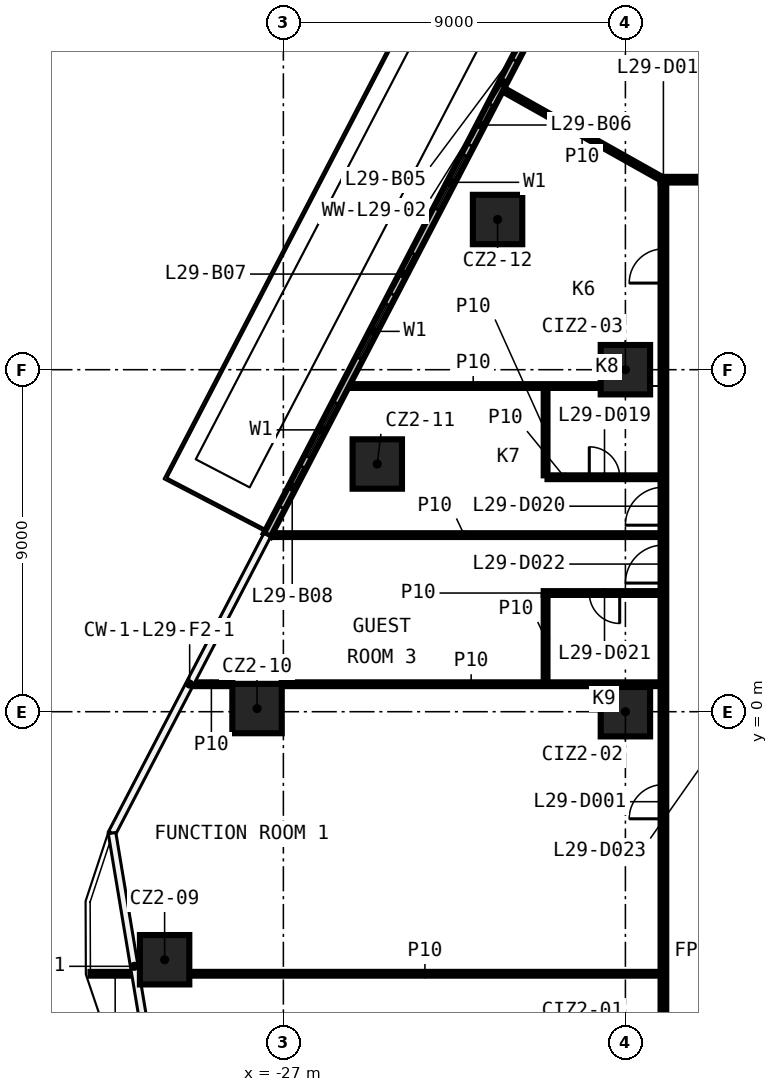
"""IFC4 building model, lengths in metres.
Left out: names, types, materials, properties, quantities, classifications, styles, units other than length and angle.
Written with IfcOpenShell. Run it as: python <this file> out.ifc"""

import sys

from ifc_helpers import new_model, si_unit, direction, frame, frame_2d, origin, origin_2d, place, context, subcontext, project, spatial, rectangle, extrude, element, fill, save


model = new_model("IFC4")
c1 = context("Model", 3, precision=1e-05, world=origin(), true_north=direction((0.0, 1.0)))
c2 = subcontext(c1, "Body", "Model", "MODEL_VIEW")
j1 = project(units=[si_unit("LENGTHUNIT", "METRE"), si_unit("PLANEANGLEUNIT", "RADIAN")], contexts=[c1])
p1 = place(None, origin())
s1 = spatial("IfcSite", under=j1, at=p1, CompositionType="ELEMENT")
p2 = place(p1, origin())
s2 = spatial("IfcBuilding", under=s1, at=p2, CompositionType="ELEMENT")
p3 = place(p2, frame((0.0, 0.0, 132.2)))
s3 = spatial("IfcBuildingStorey", under=s2, at=p3, CompositionType="ELEMENT", Elevation=132.2)
for number, where, z_axis, x_axis in (
    (1, (-30.125, -6.527, 0.0), (0.0, 0.0, 1.0), (1.0, 0.0, 0.0)),
    (2, (-27.693, 0.083, 0.0), (0.0, 0.0, 1.0), (1.0, 0.0, 0.0)),
    (3, (-24.529, 6.518, 0.0), (0.0, 0.0, 1.0), (1.0, 0.0, 0.0)),
    (4, (-21.364, 12.952, 0.0), (0.0, 0.0, 1.0), (1.0, 0.0, 0.0)),
    (5, (-18.0, 0.0, 0.0), (0.0, 0.0, 1.0), (1.0, 0.0, 0.0)),
    (6, (-18.0, 9.0, 0.0), (0.0, 0.0, 1.0), (1.0, 0.0, 0.0)),
):
    element("IfcColumn", number, at=place(p3, frame(where, z_axis=z_axis, x_axis=x_axis)), inside=s3, PredefinedType="COLUMN", context=c2, shape_type="SweptSolid", body=[
        extrude(rectangle(XDim=1.3, YDim=1.3, at=origin_2d()), origin(), (0.0, 0.0, 1.0), 3.3),
    ])
p4 = place(p3, frame((-32.076, -6.896, 0.0), z_axis=(0.0, 0.0, 1.0), x_axis=(1.0, 0.0, 0.0)))
e7 = element("IfcWall", 7, at=p4, inside=s3, PredefinedType="PARTITIONING", context=c2, shape_type="SweptSolid", body=[
    extrude(rectangle(XDim=1.301, YDim=0.1, at=frame_2d((0.651, 0.0))), origin(), (0.0, 0.0, 1.0), 3.3),
])
p5 = place(p3, frame((-29.475, -6.896, 0.0), z_axis=(0.0, 0.0, 1.0), x_axis=(1.0, 0.0, 0.0)))
e8 = element("IfcWall", 8, at=p5, inside=s3, PredefinedType="PARTITIONING", context=c2, shape_type="SweptSolid", body=[
    extrude(rectangle(XDim=12.4, YDim=0.1, at=frame_2d((6.2, 0.0))), origin(), (0.0, 0.0, 1.0), 3.3),
])
p6 = place(p3, frame((-29.446, 0.723, 0.0), z_axis=(0.0, 0.0, 1.0), x_axis=(1.0, 0.0, 0.0)))
e9 = element("IfcWall", 9, at=p6, inside=s3, PredefinedType="PARTITIONING", context=c2, shape_type="SweptSolid", body=[
    extrude(rectangle(XDim=1.103, YDim=0.1, at=frame_2d((0.551, 0.0))), origin(), (0.0, 0.0, 1.0), 3.3),
])
p7 = place(p3, frame((-27.043, 0.723, 0.0), z_axis=(0.0, 0.0, 1.0), x_axis=(1.0, 0.0, 0.0)))
e10 = element("IfcWall", 10, at=p7, inside=s3, PredefinedType="PARTITIONING", context=c2, shape_type="SweptSolid", body=[
    extrude(rectangle(XDim=9.968, YDim=0.1, at=frame_2d((4.984, 0.0))), origin(), (0.0, 0.0, 1.0), 3.3),
])
p8 = place(p3, frame((-17.075, 3.123, 0.0), z_axis=(0.0, 0.0, 1.0), x_axis=(-1.0, 0.0, 0.0)))
e11 = element("IfcWall", 11, at=p8, inside=s3, PredefinedType="PARTITIONING", context=c2, shape_type="SweptSolid", body=[
    extrude(rectangle(XDim=3.075, YDim=0.1, at=frame_2d((1.538, 0.0))), origin(), (0.0, 0.0, 1.0), 3.3),
])
p9 = place(p8, frame((1.075, 0.0, 0.0)))
e12 = element("IfcOpeningElement", 12, at=p9, cuts=e11, PredefinedType="OPENING", context=c2, shape_type="SweptSolid", body=[
    extrude(rectangle(XDim=0.8, YDim=2.1, at=frame_2d((0.4, 1.05))), frame((0.0, 0.06, 0.0), z_axis=(0.0, -1.0, 0.0), x_axis=(1.0, 0.0, 0.0)), (0.0, 0.0, 1.0), 0.12),
])
p10 = place(p3, frame((-27.402, 4.647, 0.0), z_axis=(0.0, 0.0, 1.0), x_axis=(1.0, 0.0, 0.0)))
e13 = element("IfcWall", 13, at=p10, inside=s3, PredefinedType="PARTITIONING", context=c2, shape_type="SweptSolid", body=[
    extrude(rectangle(XDim=10.327, YDim=0.1, at=frame_2d((5.164, 0.0))), origin(), (0.0, 0.0, 1.0), 3.3),
])
p11 = place(p3, frame((-20.05, 6.17, 0.0), z_axis=(0.0, 0.0, 1.0), x_axis=(1.0, 0.0, 0.0)))
e14 = element("IfcWall", 14, at=p11, inside=s3, PredefinedType="PARTITIONING", context=c2, shape_type="SweptSolid", body=[
    extrude(rectangle(XDim=2.975, YDim=0.1, at=frame_2d((1.488, 0.0))), origin(), (0.0, 0.0, 1.0), 3.3),
])
p12 = place(p11, frame((1.1, 0.0, 0.0)))
e15 = element("IfcOpeningElement", 15, at=p12, cuts=e14, PredefinedType="OPENING", context=c2, shape_type="SweptSolid", body=[
    extrude(rectangle(XDim=0.8, YDim=2.1, at=frame_2d((0.4, 1.05))), frame((0.0, 0.06, 0.0), z_axis=(0.0, -1.0, 0.0), x_axis=(1.0, 0.0, 0.0)), (0.0, 0.0, 1.0), 0.12),
])
p13 = place(p3, frame((-25.359, 8.57, 0.0), z_axis=(0.0, 0.0, 1.0), x_axis=(1.0, 0.0, 0.0)))
e16 = element("IfcWall", 16, at=p13, inside=s3, PredefinedType="PARTITIONING", context=c2, shape_type="SweptSolid", body=[
    extrude(rectangle(XDim=6.709, YDim=0.1, at=frame_2d((3.354, 0.0))), origin(), (0.0, 0.0, 1.0), 3.3),
])
p14 = place(p3, frame((-17.075, 14.0, 0.0), z_axis=(0.0, 0.0, 1.0), x_axis=(1.0, 0.0, 0.0)))
e17 = element("IfcWall", 17, at=p14, inside=s3, PredefinedType="PARTITIONING", context=c2, shape_type="SweptSolid", body=[
    extrude(rectangle(XDim=34.15, YDim=0.15, at=frame_2d((17.075, 0.0))), origin(), (0.0, 0.0, 1.0), 3.3),
])
p15 = place(p14, frame((10.954, 0.0, 0.0)))
e18 = element("IfcOpeningElement", 18, at=p15, cuts=e17, PredefinedType="OPENING", context=c2, shape_type="SweptSolid", body=[
    extrude(rectangle(XDim=0.9, YDim=2.1, at=frame_2d((0.45, 1.05))), frame((0.0, 0.085, 0.0), z_axis=(0.0, -1.0, 0.0), x_axis=(1.0, 0.0, 0.0)), (0.0, 0.0, 1.0), 0.17),
])
p16 = place(p14, frame((7.617, 0.0, 0.0)))
e19 = element("IfcOpeningElement", 19, at=p16, cuts=e17, PredefinedType="OPENING", context=c2, shape_type="SweptSolid", body=[
    extrude(rectangle(XDim=1.0, YDim=2.1, at=frame_2d((0.5, 1.05))), frame((0.0, 0.085, 0.0), z_axis=(0.0, -1.0, 0.0), x_axis=(1.0, 0.0, 0.0)), (0.0, 0.0, 1.0), 0.17),
])
p17 = place(p14, frame((2.425, 0.0, 0.0)))
e20 = element("IfcOpeningElement", 20, at=p17, cuts=e17, PredefinedType="OPENING", context=c2, shape_type="SweptSolid", body=[
    extrude(rectangle(XDim=0.9, YDim=2.1, at=frame_2d((0.45, 1.05))), frame((0.0, 0.085, 0.0), z_axis=(0.0, -1.0, 0.0), x_axis=(1.0, 0.0, 0.0)), (0.0, 0.0, 1.0), 0.17),
])
p18 = place(p3, frame((-17.0, -13.925, 0.0), z_axis=(0.0, 0.0, 1.0), x_axis=(0.0, 1.0, 0.0)))
e21 = element("IfcWall", 21, at=p18, inside=s3, PredefinedType="PARTITIONING", context=c2, shape_type="SweptSolid", body=[
    extrude(rectangle(XDim=27.85, YDim=0.15, at=frame_2d((13.925, 0.0))), origin(), (0.0, 0.0, 1.0), 3.3),
])
p19 = place(p18, frame((11.107, 0.0, 0.0)))
e22 = element("IfcOpeningElement", 22, at=p19, cuts=e21, PredefinedType="OPENING", context=c2, shape_type="SweptSolid", body=[
    extrude(rectangle(XDim=0.9, YDim=2.1, at=frame_2d((0.45, 1.05))), frame((0.0, 0.085, 0.0), z_axis=(0.0, -1.0, 0.0), x_axis=(1.0, 0.0, 0.0)), (0.0, 0.0, 1.0), 0.17),
])
p20 = place(p18, frame((25.204, 0.0, 0.0)))
e23 = element("IfcOpeningElement", 23, at=p20, cuts=e21, PredefinedType="OPENING", context=c2, shape_type="SweptSolid", body=[
    extrude(rectangle(XDim=0.9, YDim=2.1, at=frame_2d((0.45, 1.05))), frame((0.0, 0.085, 0.0), z_axis=(0.0, -1.0, 0.0), x_axis=(1.0, 0.0, 0.0)), (0.0, 0.0, 1.0), 0.17),
])
p21 = place(p18, frame((18.833, 0.0, 0.0)))
e24 = element("IfcOpeningElement", 24, at=p21, cuts=e21, PredefinedType="OPENING", context=c2, shape_type="SweptSolid", body=[
    extrude(rectangle(XDim=1.0, YDim=2.1, at=frame_2d((0.5, 1.05))), frame((0.0, 0.085, 0.0), z_axis=(0.0, -1.0, 0.0), x_axis=(1.0, 0.0, 0.0)), (0.0, 0.0, 1.0), 0.17),
])
p22 = place(p18, frame((17.31, 0.0, 0.0)))
e25 = element("IfcOpeningElement", 25, at=p22, cuts=e21, PredefinedType="OPENING", context=c2, shape_type="SweptSolid", body=[
    extrude(rectangle(XDim=1.0, YDim=2.1, at=frame_2d((0.5, 1.05))), frame((0.0, 0.085, 0.0), z_axis=(0.0, -1.0, 0.0), x_axis=(1.0, 0.0, 0.0)), (0.0, 0.0, 1.0), 0.17),
])
for number, where, z_axis, x_axis in (
    (26, (-20.1, 0.773, 0.0), (0.0, 0.0, 1.0), (0.0, 1.0, 0.0)),
    (27, (-20.1, 6.219, 0.0), (0.0, 0.0, 1.0), (0.0, 1.0, 0.0)),
):
    element("IfcWall", number, at=place(p3, frame(where, z_axis=z_axis, x_axis=x_axis)), inside=s3, PredefinedType="PARTITIONING", context=c2, shape_type="SweptSolid", body=[
        extrude(rectangle(XDim=2.3, YDim=0.1, at=frame_2d((1.15, 0.0))), origin(), (0.0, 0.0, 1.0), 3.3),
    ])
p23 = place(p3, frame((-21.279, 16.405, 0.0), z_axis=(0.0, 0.0, 1.0), x_axis=(0.871729599924, -0.489987249443, 0.0)))
e28 = element("IfcWall", 28, at=p23, inside=s3, PredefinedType="PARTITIONING", context=c2, shape_type="SweptSolid", body=[
    extrude(rectangle(XDim=4.908, YDim=0.1, at=frame_2d((2.454, 0.0))), origin(), (0.0, 0.0, 1.0), 3.3),
])
p24 = place(p3, frame((-17.21, 24.26, 0.0), z_axis=(0.0, 0.0, 1.0), x_axis=(-0.461902936619, -0.886930480445, 0.0)))
e29 = element("IfcWall", 29, at=p24, inside=s3, PredefinedType="SOLIDWALL", context=c2, shape_type="SweptSolid", body=[
    extrude(rectangle(XDim=22.113, YDim=0.2, at=frame_2d((11.057, 0.0))), origin(), (0.0, 0.0, 1.0), 3.3),
])
p25 = place(p24, frame((2.0, 0.0, 0.6)))
e30 = element("IfcOpeningElement", 30, at=p25, cuts=e29, PredefinedType="OPENING", context=c2, shape_type="SweptSolid", body=[
    extrude(rectangle(XDim=1.6, YDim=2.4, at=frame_2d((0.8, 1.2))), frame((0.0, 0.11, 0.0), z_axis=(0.0, -1.0, 0.0), x_axis=(1.0, 0.0, 0.0)), (0.0, 0.0, 1.0), 0.22),
])
p26 = place(p24, frame((0.5, 0.0, 0.0)))
e31 = element("IfcOpeningElement", 31, at=p26, cuts=e29, PredefinedType="OPENING", context=c2, shape_type="SweptSolid", body=[
    extrude(rectangle(XDim=1.2, YDim=2.4, at=frame_2d((0.6, 1.2))), frame((0.0, 0.11, 0.0), z_axis=(0.0, -1.0, 0.0), x_axis=(1.0, 0.0, 0.0)), (0.0, 0.0, 1.0), 0.22),
])
p27 = place(p24, frame((4.923, 0.0, 0.6)))
e32 = element("IfcOpeningElement", 32, at=p27, cuts=e29, PredefinedType="OPENING", context=c2, shape_type="SweptSolid", body=[
    extrude(rectangle(XDim=1.6, YDim=2.4, at=frame_2d((0.8, 1.2))), frame((0.0, 0.11, 0.0), z_axis=(0.0, -1.0, 0.0), x_axis=(1.0, 0.0, 0.0)), (0.0, 0.0, 1.0), 0.22),
])
p28 = place(p24, frame((6.823, 0.0, 0.0)))
e33 = element("IfcOpeningElement", 33, at=p28, cuts=e29, PredefinedType="OPENING", context=c2, shape_type="SweptSolid", body=[
    extrude(rectangle(XDim=1.2, YDim=2.4, at=frame_2d((0.6, 1.2))), frame((0.0, 0.11, 0.0), z_axis=(0.0, -1.0, 0.0), x_axis=(1.0, 0.0, 0.0)), (0.0, 0.0, 1.0), 0.22),
])
p29 = place(p24, frame((10.845, 0.0, 0.6)))
e34 = element("IfcOpeningElement", 34, at=p29, cuts=e29, PredefinedType="OPENING", context=c2, shape_type="SweptSolid", body=[
    extrude(rectangle(XDim=1.6, YDim=2.4, at=frame_2d((0.8, 1.2))), frame((0.0, 0.11, 0.0), z_axis=(0.0, -1.0, 0.0), x_axis=(1.0, 0.0, 0.0)), (0.0, 0.0, 1.0), 0.22),
])
p30 = place(p24, frame((9.345, 0.0, 0.0)))
e35 = element("IfcOpeningElement", 35, at=p30, cuts=e29, PredefinedType="OPENING", context=c2, shape_type="SweptSolid", body=[
    extrude(rectangle(XDim=1.2, YDim=2.4, at=frame_2d((0.6, 1.2))), frame((0.0, 0.11, 0.0), z_axis=(0.0, -1.0, 0.0), x_axis=(1.0, 0.0, 0.0)), (0.0, 0.0, 1.0), 0.22),
])
p31 = place(p24, frame((15.268, 0.0, 0.6)))
e36 = element("IfcOpeningElement", 36, at=p31, cuts=e29, PredefinedType="OPENING", context=c2, shape_type="SweptSolid", body=[
    extrude(rectangle(XDim=1.6, YDim=2.4, at=frame_2d((0.8, 1.2))), frame((0.0, 0.11, 0.0), z_axis=(0.0, -1.0, 0.0), x_axis=(1.0, 0.0, 0.0)), (0.0, 0.0, 1.0), 0.22),
])
p32 = place(p24, frame((13.768, 0.0, 0.0)))
e37 = element("IfcOpeningElement", 37, at=p32, cuts=e29, PredefinedType="OPENING", context=c2, shape_type="SweptSolid", body=[
    extrude(rectangle(XDim=1.2, YDim=2.4, at=frame_2d((0.6, 1.2))), frame((0.0, 0.11, 0.0), z_axis=(0.0, -1.0, 0.0), x_axis=(1.0, 0.0, 0.0)), (0.0, 0.0, 1.0), 0.22),
])
p33 = place(p24, frame((18.19, 0.0, 0.6)))
e38 = element("IfcOpeningElement", 38, at=p33, cuts=e29, PredefinedType="OPENING", context=c2, shape_type="SweptSolid", body=[
    extrude(rectangle(XDim=1.6, YDim=2.4, at=frame_2d((0.8, 1.2))), frame((0.0, 0.11, 0.0), z_axis=(0.0, -1.0, 0.0), x_axis=(1.0, 0.0, 0.0)), (0.0, 0.0, 1.0), 0.22),
])
p34 = place(p24, frame((20.09, 0.0, 0.0)))
e39 = element("IfcOpeningElement", 39, at=p34, cuts=e29, PredefinedType="OPENING", context=c2, shape_type="SweptSolid", body=[
    extrude(rectangle(XDim=1.2, YDim=2.4, at=frame_2d((0.6, 1.2))), frame((0.0, 0.11, 0.0), z_axis=(0.0, -1.0, 0.0), x_axis=(1.0, 0.0, 0.0)), (0.0, 0.0, 1.0), 0.22),
])
p35 = place(p19, origin())
e40 = element("IfcDoor", 40, at=p35, inside=s3, OperationType="SINGLE_SWING_RIGHT", PredefinedType="DOOR", context=c2, shape_type="SweptSolid", body=[
    extrude(rectangle(XDim=0.9, YDim=2.1, at=frame_2d((0.45, 1.05))), frame((0.0, 0.025, 0.0), z_axis=(0.0, -1.0, 0.0), x_axis=(1.0, 0.0, 0.0)), (0.0, 0.0, 1.0), 0.05),
])
fill(e22, e40)
p36 = place(p20, origin())
e41 = element("IfcDoor", 41, at=p36, inside=s3, OperationType="SINGLE_SWING_LEFT", PredefinedType="DOOR", context=c2, shape_type="SweptSolid", body=[
    extrude(rectangle(XDim=0.9, YDim=2.1, at=frame_2d((0.45, 1.05))), frame((0.0, 0.025, 0.0), z_axis=(0.0, -1.0, 0.0), x_axis=(1.0, 0.0, 0.0)), (0.0, 0.0, 1.0), 0.05),
])
fill(e23, e41)
p37 = place(p12, origin())
e42 = element("IfcDoor", 42, at=p37, inside=s3, OperationType="SINGLE_SWING_LEFT", PredefinedType="DOOR", context=c2, shape_type="SweptSolid", body=[
    extrude(rectangle(XDim=0.8, YDim=2.1, at=frame_2d((0.4, 1.05))), frame((0.0, 0.025, 0.0), z_axis=(0.0, -1.0, 0.0), x_axis=(1.0, 0.0, 0.0)), (0.0, 0.0, 1.0), 0.05),
])
fill(e15, e42)
p38 = place(p21, origin())
e43 = element("IfcDoor", 43, at=p38, inside=s3, OperationType="SINGLE_SWING_RIGHT", PredefinedType="DOOR", context=c2, shape_type="SweptSolid", body=[
    extrude(rectangle(XDim=1.0, YDim=2.1, at=frame_2d((0.5, 1.05))), frame((0.0, 0.025, 0.0), z_axis=(0.0, -1.0, 0.0), x_axis=(1.0, 0.0, 0.0)), (0.0, 0.0, 1.0), 0.05),
])
fill(e24, e43)
p39 = place(p9, origin())
e44 = element("IfcDoor", 44, at=p39, inside=s3, OperationType="SINGLE_SWING_RIGHT", PredefinedType="DOOR", context=c2, shape_type="SweptSolid", body=[
    extrude(rectangle(XDim=0.8, YDim=2.1, at=frame_2d((0.4, 1.05))), frame((0.0, 0.025, 0.0), z_axis=(0.0, -1.0, 0.0), x_axis=(1.0, 0.0, 0.0)), (0.0, 0.0, 1.0), 0.05),
])
fill(e12, e44)
p40 = place(p22, origin())
e45 = element("IfcDoor", 45, at=p40, inside=s3, OperationType="SINGLE_SWING_LEFT", PredefinedType="DOOR", context=c2, shape_type="SweptSolid", body=[
    extrude(rectangle(XDim=1.0, YDim=2.1, at=frame_2d((0.5, 1.05))), frame((0.0, 0.025, 0.0), z_axis=(0.0, -1.0, 0.0), x_axis=(1.0, 0.0, 0.0)), (0.0, 0.0, 1.0), 0.05),
])
fill(e25, e45)
p41 = place(p28, origin())
e46 = element("IfcDoor", 46, at=p41, inside=s3, OperationType="SLIDING_TO_LEFT", PredefinedType="DOOR", context=c2, shape_type="SweptSolid", body=[
    extrude(rectangle(XDim=1.2, YDim=2.4, at=frame_2d((0.6, 1.2))), frame((0.0, 0.025, 0.0), z_axis=(0.0, -1.0, 0.0), x_axis=(1.0, 0.0, 0.0)), (0.0, 0.0, 1.0), 0.05),
])
fill(e33, e46)
p42 = place(p29, origin())
e47 = element("IfcWindow", 47, at=p42, inside=s3, PartitioningType="SINGLE_PANEL", PredefinedType="WINDOW", context=c2, shape_type="SweptSolid", body=[
    extrude(rectangle(XDim=1.6, YDim=2.4, at=frame_2d((0.8, 1.2))), frame((0.0, 0.03, 0.0), z_axis=(0.0, -1.0, 0.0), x_axis=(1.0, 0.0, 0.0)), (0.0, 0.0, 1.0), 0.06),
])
fill(e34, e47)
p43 = place(p30, origin())
e48 = element("IfcDoor", 48, at=p43, inside=s3, OperationType="SLIDING_TO_LEFT", PredefinedType="DOOR", context=c2, shape_type="SweptSolid", body=[
    extrude(rectangle(XDim=1.2, YDim=2.4, at=frame_2d((0.6, 1.2))), frame((0.0, 0.025, 0.0), z_axis=(0.0, -1.0, 0.0), x_axis=(1.0, 0.0, 0.0)), (0.0, 0.0, 1.0), 0.05),
])
fill(e35, e48)
p44 = place(p31, origin())
e49 = element("IfcWindow", 49, at=p44, inside=s3, PartitioningType="SINGLE_PANEL", PredefinedType="WINDOW", context=c2, shape_type="SweptSolid", body=[
    extrude(rectangle(XDim=1.6, YDim=2.4, at=frame_2d((0.8, 1.2))), frame((0.0, 0.03, 0.0), z_axis=(0.0, -1.0, 0.0), x_axis=(1.0, 0.0, 0.0)), (0.0, 0.0, 1.0), 0.06),
])
fill(e36, e49)
p45 = place(p32, origin())
e50 = element("IfcDoor", 50, at=p45, inside=s3, OperationType="SLIDING_TO_LEFT", PredefinedType="DOOR", context=c2, shape_type="SweptSolid", body=[
    extrude(rectangle(XDim=1.2, YDim=2.4, at=frame_2d((0.6, 1.2))), frame((0.0, 0.025, 0.0), z_axis=(0.0, -1.0, 0.0), x_axis=(1.0, 0.0, 0.0)), (0.0, 0.0, 1.0), 0.05),
])
fill(e37, e50)
p46 = place(p33, origin())
e51 = element("IfcWindow", 51, at=p46, inside=s3, PartitioningType="SINGLE_PANEL", PredefinedType="WINDOW", context=c2, shape_type="SweptSolid", body=[
    extrude(rectangle(XDim=1.6, YDim=2.4, at=frame_2d((0.8, 1.2))), frame((0.0, 0.03, 0.0), z_axis=(0.0, -1.0, 0.0), x_axis=(1.0, 0.0, 0.0)), (0.0, 0.0, 1.0), 0.06),
])
fill(e38, e51)
p47 = place(p34, origin())
e52 = element("IfcDoor", 52, at=p47, inside=s3, OperationType="SLIDING_TO_LEFT", PredefinedType="DOOR", context=c2, shape_type="SweptSolid", body=[
    extrude(rectangle(XDim=1.2, YDim=2.4, at=frame_2d((0.6, 1.2))), frame((0.0, 0.025, 0.0), z_axis=(0.0, -1.0, 0.0), x_axis=(1.0, 0.0, 0.0)), (0.0, 0.0, 1.0), 0.05),
])
fill(e39, e52)
save(model, sys.argv[1])
